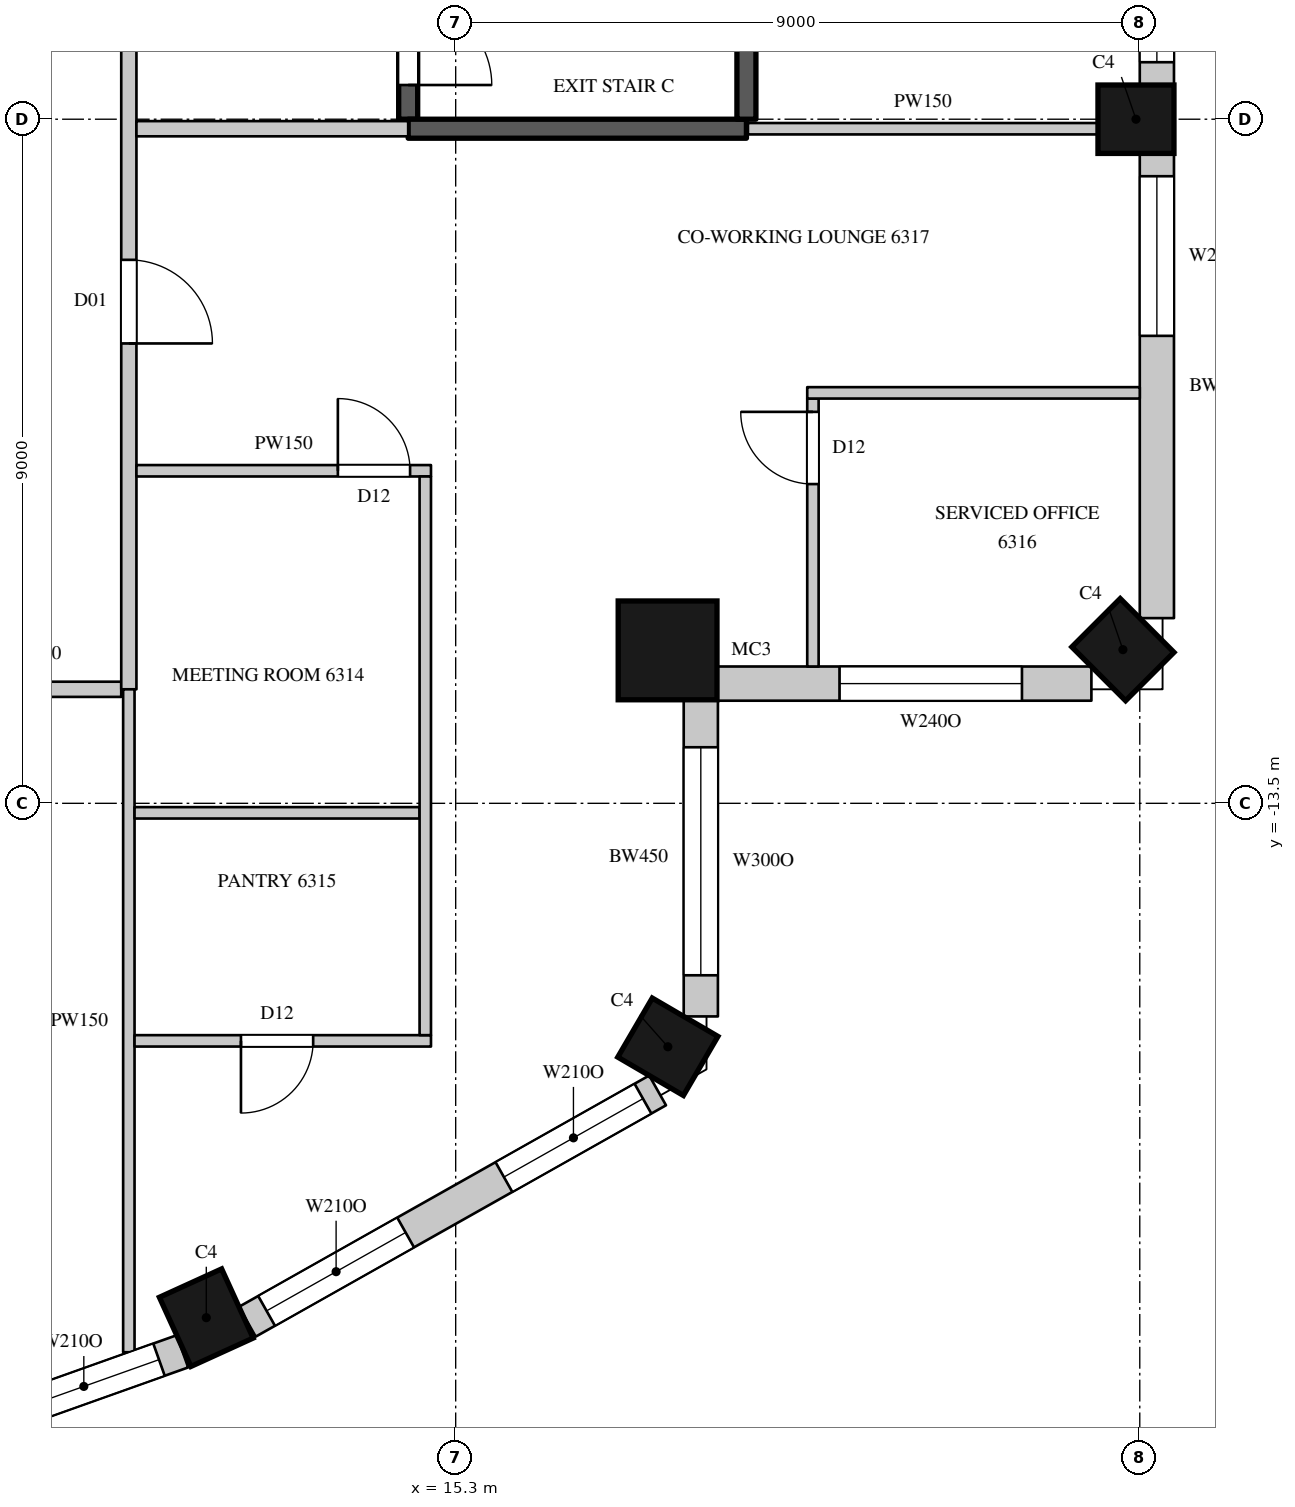
"""IFC4 building model, lengths in metres.
Left out: names, types, materials, properties, quantities, classifications, styles, units other than length and angle.
Written with IfcOpenShell. Run it as: python <this file> out.ifc"""

import sys

from ifc_helpers import new_model, si_unit, direction, frame, frame_2d, origin, origin_2d, place, context, subcontext, project, spatial, rectangle, circle, extrude, element, fill, save


model = new_model("IFC4")
c1 = context("Model", 3, precision=1e-05, world=origin(), true_north=direction((0.0, 1.0)))
c2 = subcontext(c1, "Body", "Model", "MODEL_VIEW")
j1 = project(units=[si_unit("LENGTHUNIT", "METRE"), si_unit("PLANEANGLEUNIT", "RADIAN")], contexts=[c1])
p1 = place(None, origin())
s1 = spatial("IfcSite", under=j1, at=p1, CompositionType="ELEMENT")
p2 = place(p1, origin())
s2 = spatial("IfcBuilding", under=s1, at=p2, CompositionType="ELEMENT")
p3 = place(p2, frame((0.0, 0.0, 280.3)))
s3 = spatial("IfcBuildingStorey", under=s2, at=p3, CompositionType="ELEMENT", Elevation=280.3)
for number, where, z_axis, x_axis in (
    (1, (12.019, -20.267, 0.0), (0.0, 0.0, 1.0), (0.91, 0.415, 0.0)),
    (2, (18.091, -16.703, 0.0), (0.0, 0.0, 1.0), (0.504, 0.863, 0.0)),
):
    element("IfcColumn", number, at=place(p3, frame(where, z_axis=z_axis, x_axis=x_axis)), inside=s3, PredefinedType="COLUMN", context=c2, shape_type="SweptSolid", body=[
        extrude(rectangle(XDim=0.9, YDim=1.0, at=origin_2d()), origin(), (0.0, 0.0, 1.0), 4.1),
    ])
p4 = place(p3, frame((18.088, -11.488, 0.0), z_axis=(0.0, 0.0, 1.0), x_axis=(1.0, 0.0, 0.0)))
e3 = element("IfcColumn", 3, at=p4, inside=s3, PredefinedType="COLUMN", context=c2, shape_type="SweptSolid", body=[
    extrude(circle(Radius=0.65, at=origin_2d()), origin(), (0.0, 0.0, 1.0), 4.1),
])
for number, where, z_axis, x_axis in (
    (4, (24.078, -11.478, 0.0), (0.0, 0.0, 1.0), (0.707, 0.707, 0.0)),
    (5, (24.25, -4.5, 0.0), (0.0, 0.0, 1.0), (0.0, 1.0, 0.0)),
):
    element("IfcColumn", number, at=place(p3, frame(where, z_axis=z_axis, x_axis=x_axis)), inside=s3, PredefinedType="COLUMN", context=c2, shape_type="SweptSolid", body=[
        extrude(rectangle(XDim=0.9, YDim=1.0, at=origin_2d()), origin(), (0.0, 0.0, 1.0), 4.1),
    ])
p5 = place(p3, frame((5.665, -22.859, 0.0), z_axis=(0.0, 0.0, 1.0), x_axis=(0.942108340262, 0.335308626803, 0.0)))
e6 = element("IfcWall", 6, at=p5, inside=s3, PredefinedType="SOLIDWALL", context=c2, shape_type="SweptSolid", body=[
    extrude(rectangle(XDim=6.412, YDim=0.45, at=frame_2d((3.206, 0.0))), origin(), (0.0, 0.0, 1.0), 3.8),
])
p6 = place(p5, frame((0.327, 0.0, 1.05)))
e7 = element("IfcOpeningElement", 7, at=p6, cuts=e6, PredefinedType="OPENING", context=c2, shape_type="SweptSolid", body=[
    extrude(rectangle(XDim=2.1, YDim=2.4, at=frame_2d((1.05, 1.2))), frame((0.0, 0.235, 0.0), z_axis=(0.0, -1.0, 0.0), x_axis=(1.0, 0.0, 0.0)), (0.0, 0.0, 1.0), 0.47),
])
p7 = place(p5, frame((3.985, 0.0, 1.05)))
e8 = element("IfcOpeningElement", 8, at=p7, cuts=e6, PredefinedType="OPENING", context=c2, shape_type="SweptSolid", body=[
    extrude(rectangle(XDim=2.1, YDim=2.4, at=frame_2d((1.05, 1.2))), frame((0.0, 0.235, 0.0), z_axis=(0.0, -1.0, 0.0), x_axis=(1.0, 0.0, 0.0)), (0.0, 0.0, 1.0), 0.47),
])
p8 = place(p3, frame((12.559, -20.32, 0.0), z_axis=(0.0, 0.0, 1.0), x_axis=(0.871065783524, 0.491166367714, 0.0)))
e9 = element("IfcWall", 9, at=p8, inside=s3, PredefinedType="SOLIDWALL", context=c2, shape_type="SweptSolid", body=[
    extrude(rectangle(XDim=6.196, YDim=0.45, at=frame_2d((3.098, 0.0))), origin(), (0.0, 0.0, 1.0), 3.8),
])
p9 = place(p8, frame((0.291, 0.0, 1.05)))
e10 = element("IfcOpeningElement", 10, at=p9, cuts=e9, PredefinedType="OPENING", context=c2, shape_type="SweptSolid", body=[
    extrude(rectangle(XDim=2.1, YDim=2.4, at=frame_2d((1.05, 1.2))), frame((0.0, 0.235, 0.0), z_axis=(0.0, -1.0, 0.0), x_axis=(1.0, 0.0, 0.0)), (0.0, 0.0, 1.0), 0.47),
])
p10 = place(p8, frame((3.875, 0.0, 1.05)))
e11 = element("IfcOpeningElement", 11, at=p10, cuts=e9, PredefinedType="OPENING", context=c2, shape_type="SweptSolid", body=[
    extrude(rectangle(XDim=2.1, YDim=2.4, at=frame_2d((1.05, 1.2))), frame((0.0, 0.235, 0.0), z_axis=(0.0, -1.0, 0.0), x_axis=(1.0, 0.0, 0.0)), (0.0, 0.0, 1.0), 0.47),
])
p11 = place(p3, frame((18.525, -16.304, 0.0), z_axis=(0.0, 0.0, 1.0), x_axis=(0.0, 1.0, 0.0)))
e12 = element("IfcWall", 12, at=p11, inside=s3, PredefinedType="SOLIDWALL", context=c2, shape_type="SweptSolid", body=[
    extrude(rectangle(XDim=4.202, YDim=0.45, at=frame_2d((2.101, 0.0))), origin(), (0.0, 0.0, 1.0), 3.8),
])
p12 = place(p11, frame((0.541, 0.0, 1.05)))
e13 = element("IfcOpeningElement", 13, at=p12, cuts=e12, PredefinedType="OPENING", context=c2, shape_type="SweptSolid", body=[
    extrude(rectangle(XDim=3.0, YDim=2.4, at=frame_2d((1.5, 1.2))), frame((0.0, 0.235, 0.0), z_axis=(0.0, -1.0, 0.0), x_axis=(1.0, 0.0, 0.0)), (0.0, 0.0, 1.0), 0.47),
])
p13 = place(p3, frame((18.701, -11.925, 0.0), z_axis=(0.0, 0.0, 1.0), x_axis=(1.0, 0.0, 0.0)))
e14 = element("IfcWall", 14, at=p13, inside=s3, PredefinedType="SOLIDWALL", context=c2, shape_type="SweptSolid", body=[
    extrude(rectangle(XDim=4.962, YDim=0.45, at=frame_2d((2.481, 0.0))), origin(), (0.0, 0.0, 1.0), 3.8),
])
p14 = place(p13, frame((1.648, 0.0, 1.05)))
e15 = element("IfcOpeningElement", 15, at=p14, cuts=e14, PredefinedType="OPENING", context=c2, shape_type="SweptSolid", body=[
    extrude(rectangle(XDim=2.4, YDim=2.4, at=frame_2d((1.2, 1.2))), frame((0.0, 0.235, 0.0), z_axis=(0.0, -1.0, 0.0), x_axis=(1.0, 0.0, 0.0)), (0.0, 0.0, 1.0), 0.47),
])
p15 = place(p3, frame((24.525, -11.064, 0.0), z_axis=(0.0, 0.0, 1.0), x_axis=(0.0, 1.0, 0.0)))
e16 = element("IfcWall", 16, at=p15, inside=s3, PredefinedType="SOLIDWALL", context=c2, shape_type="SweptSolid", body=[
    extrude(rectangle(XDim=6.114, YDim=0.45, at=frame_2d((3.057, 0.0))), origin(), (0.0, 0.0, 1.0), 3.8),
])
p16 = place(p15, frame((3.714, 0.0, 1.05)))
e17 = element("IfcOpeningElement", 17, at=p16, cuts=e16, PredefinedType="OPENING", context=c2, shape_type="SweptSolid", body=[
    extrude(rectangle(XDim=2.1, YDim=2.4, at=frame_2d((1.05, 1.2))), frame((0.0, 0.235, 0.0), z_axis=(0.0, -1.0, 0.0), x_axis=(1.0, 0.0, 0.0)), (0.0, 0.0, 1.0), 0.47),
])
p17 = place(p3, frame((24.525, -4.05, 0.0), z_axis=(0.0, 0.0, 1.0), x_axis=(0.0, 1.0, 0.0)))
e18 = element("IfcWall", 18, at=p17, inside=s3, PredefinedType="SOLIDWALL", context=c2, shape_type="SweptSolid", body=[
    extrude(rectangle(XDim=8.1, YDim=0.45, at=frame_2d((4.05, 0.0))), origin(), (0.0, 0.0, 1.0), 3.8),
])
p18 = place(p17, frame((0.3, 0.0, 1.05)))
e19 = element("IfcOpeningElement", 19, at=p18, cuts=e18, PredefinedType="OPENING", context=c2, shape_type="SweptSolid", body=[
    extrude(rectangle(XDim=3.0, YDim=2.4, at=frame_2d((1.5, 1.2))), frame((0.0, 0.235, 0.0), z_axis=(0.0, -1.0, 0.0), x_axis=(1.0, 0.0, 0.0)), (0.0, 0.0, 1.0), 0.47),
])
p19 = place(p17, frame((4.8, 0.0, 1.05)))
e20 = element("IfcOpeningElement", 20, at=p19, cuts=e18, PredefinedType="OPENING", context=c2, shape_type="SweptSolid", body=[
    extrude(rectangle(XDim=3.0, YDim=2.4, at=frame_2d((1.5, 1.2))), frame((0.0, 0.235, 0.0), z_axis=(0.0, -1.0, 0.0), x_axis=(1.0, 0.0, 0.0)), (0.0, 0.0, 1.0), 0.47),
])
p20 = place(p3, frame((-10.9, -12.0, 0.0), z_axis=(0.0, 0.0, 1.0), x_axis=(1.0, 0.0, 0.0)))
e21 = element("IfcWall", 21, at=p20, inside=s3, PredefinedType="PARTITIONING", context=c2, shape_type="SweptSolid", body=[
    extrude(rectangle(XDim=21.8, YDim=0.2, at=frame_2d((10.9, 0.0))), origin(), (0.0, 0.0, 1.0), 3.8),
])
p21 = place(p20, frame((1.1, 0.0, 0.0)))
e22 = element("IfcOpeningElement", 22, at=p21, cuts=e21, PredefinedType="OPENING", context=c2, shape_type="SweptSolid", body=[
    extrude(rectangle(XDim=0.9, YDim=2.2, at=frame_2d((0.45, 1.1))), frame((0.0, 0.11, 0.0), z_axis=(0.0, -1.0, 0.0), x_axis=(1.0, 0.0, 0.0)), (0.0, 0.0, 1.0), 0.22),
])
p22 = place(p20, frame((4.9, 0.0, 0.0)))
e23 = element("IfcOpeningElement", 23, at=p22, cuts=e21, PredefinedType="OPENING", context=c2, shape_type="SweptSolid", body=[
    extrude(rectangle(XDim=0.9, YDim=2.2, at=frame_2d((0.45, 1.1))), frame((0.0, 0.11, 0.0), z_axis=(0.0, -1.0, 0.0), x_axis=(1.0, 0.0, 0.0)), (0.0, 0.0, 1.0), 0.22),
])
p23 = place(p20, frame((7.0, 0.0, 0.0)))
e24 = element("IfcOpeningElement", 24, at=p23, cuts=e21, PredefinedType="OPENING", context=c2, shape_type="SweptSolid", body=[
    extrude(rectangle(XDim=0.9, YDim=2.2, at=frame_2d((0.45, 1.1))), frame((0.0, 0.11, 0.0), z_axis=(0.0, -1.0, 0.0), x_axis=(1.0, 0.0, 0.0)), (0.0, 0.0, 1.0), 0.22),
])
p24 = place(p20, frame((9.95, 0.0, 0.0)))
e25 = element("IfcOpeningElement", 25, at=p24, cuts=e21, PredefinedType="OPENING", context=c2, shape_type="SweptSolid", body=[
    extrude(rectangle(XDim=1.1, YDim=2.4, at=frame_2d((0.55, 1.2))), frame((0.0, 0.11, 0.0), z_axis=(0.0, -1.0, 0.0), x_axis=(1.0, 0.0, 0.0)), (0.0, 0.0, 1.0), 0.22),
])
p25 = place(p3, frame((11.0, -12.0, 0.0), z_axis=(0.0, 0.0, 1.0), x_axis=(0.0, 1.0, 0.0)))
e26 = element("IfcWall", 26, at=p25, inside=s3, PredefinedType="PARTITIONING", context=c2, shape_type="SweptSolid", body=[
    extrude(rectangle(XDim=24.1, YDim=0.2, at=frame_2d((12.05, 0.0))), origin(), (0.0, 0.0, 1.0), 3.8),
])
p26 = place(p25, frame((9.85, 0.0, 0.0)))
e27 = element("IfcOpeningElement", 27, at=p26, cuts=e26, PredefinedType="OPENING", context=c2, shape_type="SweptSolid", body=[
    extrude(rectangle(XDim=1.5, YDim=2.4, at=frame_2d((0.75, 1.2))), frame((0.0, 0.11, 0.0), z_axis=(0.0, -1.0, 0.0), x_axis=(1.0, 0.0, 0.0)), (0.0, 0.0, 1.0), 0.22),
])
p27 = place(p25, frame((4.55, 0.0, 0.0)))
e28 = element("IfcOpeningElement", 28, at=p27, cuts=e26, PredefinedType="OPENING", context=c2, shape_type="SweptSolid", body=[
    extrude(rectangle(XDim=1.1, YDim=2.4, at=frame_2d((0.55, 1.2))), frame((0.0, 0.11, 0.0), z_axis=(0.0, -1.0, 0.0), x_axis=(1.0, 0.0, 0.0)), (0.0, 0.0, 1.0), 0.22),
])
p28 = place(p3, frame((11.1, -4.625, 0.0), z_axis=(0.0, 0.0, 1.0), x_axis=(1.0, 0.0, 0.0)))
e29 = element("IfcWall", 29, at=p28, inside=s3, PredefinedType="PARTITIONING", context=c2, shape_type="SweptSolid", body=[
    extrude(rectangle(XDim=3.575, YDim=0.2, at=frame_2d((1.788, 0.0))), origin(), (0.0, 0.0, 1.0), 3.8),
])
p29 = place(p3, frame((11.0, -20.721, 0.0), z_axis=(0.0, 0.0, 1.0), x_axis=(0.0, 1.0, 0.0)))
e30 = element("IfcWall", 30, at=p29, inside=s3, PredefinedType="PARTITIONING", context=c2, shape_type="SweptSolid", body=[
    extrude(rectangle(XDim=8.721, YDim=0.15, at=frame_2d((4.361, 0.0))), origin(), (0.0, 0.0, 1.0), 3.8),
])
p30 = place(p3, frame((11.075, -16.625, 0.0), z_axis=(0.0, 0.0, 1.0), x_axis=(1.0, 0.0, 0.0)))
e31 = element("IfcWall", 31, at=p30, inside=s3, PredefinedType="PARTITIONING", context=c2, shape_type="SweptSolid", body=[
    extrude(rectangle(XDim=3.9, YDim=0.15, at=frame_2d((1.95, 0.0))), origin(), (0.0, 0.0, 1.0), 3.8),
])
p31 = place(p30, frame((1.4, 0.0, 0.0)))
e32 = element("IfcOpeningElement", 32, at=p31, cuts=e31, PredefinedType="OPENING", context=c2, shape_type="SweptSolid", body=[
    extrude(rectangle(XDim=0.95, YDim=2.2, at=frame_2d((0.475, 1.1))), frame((0.0, 0.085, 0.0), z_axis=(0.0, -1.0, 0.0), x_axis=(1.0, 0.0, 0.0)), (0.0, 0.0, 1.0), 0.17),
])
p32 = place(p3, frame((11.075, -13.625, 0.0), z_axis=(0.0, 0.0, 1.0), x_axis=(1.0, 0.0, 0.0)))
e33 = element("IfcWall", 33, at=p32, inside=s3, PredefinedType="PARTITIONING", context=c2, shape_type="SweptSolid", body=[
    extrude(rectangle(XDim=3.75, YDim=0.15, at=frame_2d((1.875, 0.0))), origin(), (0.0, 0.0, 1.0), 3.8),
])
p33 = place(p3, frame((11.1, -9.125, 0.0), z_axis=(0.0, 0.0, 1.0), x_axis=(1.0, 0.0, 0.0)))
e34 = element("IfcWall", 34, at=p33, inside=s3, PredefinedType="PARTITIONING", context=c2, shape_type="SweptSolid", body=[
    extrude(rectangle(XDim=3.875, YDim=0.15, at=frame_2d((1.938, 0.0))), origin(), (0.0, 0.0, 1.0), 3.8),
])
p34 = place(p33, frame((2.65, 0.0, 0.0)))
e35 = element("IfcOpeningElement", 35, at=p34, cuts=e34, PredefinedType="OPENING", context=c2, shape_type="SweptSolid", body=[
    extrude(rectangle(XDim=0.95, YDim=2.2, at=frame_2d((0.475, 1.1))), frame((0.0, 0.085, 0.0), z_axis=(0.0, -1.0, 0.0), x_axis=(1.0, 0.0, 0.0)), (0.0, 0.0, 1.0), 0.17),
])
p35 = place(p3, frame((14.9, -16.55, 0.0), z_axis=(0.0, 0.0, 1.0), x_axis=(0.0, 1.0, 0.0)))
e36 = element("IfcWall", 36, at=p35, inside=s3, PredefinedType="PARTITIONING", context=c2, shape_type="SweptSolid", body=[
    extrude(rectangle(XDim=7.35, YDim=0.15, at=frame_2d((3.675, 0.0))), origin(), (0.0, 0.0, 1.0), 3.8),
])
p36 = place(p3, frame((19.145, -4.625, 0.0), z_axis=(0.0, 0.0, 1.0), x_axis=(1.0, 0.0, 0.0)))
e37 = element("IfcWall", 37, at=p36, inside=s3, PredefinedType="PARTITIONING", context=c2, shape_type="SweptSolid", body=[
    extrude(rectangle(XDim=4.605, YDim=0.15, at=frame_2d((2.302, 0.0))), origin(), (0.0, 0.0, 1.0), 3.8),
])
p37 = place(p3, frame((20.0, -11.7, 0.0), z_axis=(0.0, 0.0, 1.0), x_axis=(0.0, 1.0, 0.0)))
e38 = element("IfcWall", 38, at=p37, inside=s3, PredefinedType="PARTITIONING", context=c2, shape_type="SweptSolid", body=[
    extrude(rectangle(XDim=3.525, YDim=0.15, at=frame_2d((1.762, 0.0))), origin(), (0.0, 0.0, 1.0), 3.8),
])
p38 = place(p37, frame((2.4, 0.0, 0.0)))
e39 = element("IfcOpeningElement", 39, at=p38, cuts=e38, PredefinedType="OPENING", context=c2, shape_type="SweptSolid", body=[
    extrude(rectangle(XDim=0.95, YDim=2.2, at=frame_2d((0.475, 1.1))), frame((0.0, 0.085, 0.0), z_axis=(0.0, -1.0, 0.0), x_axis=(1.0, 0.0, 0.0)), (0.0, 0.0, 1.0), 0.17),
])
p39 = place(p3, frame((19.925, -8.1, 0.0), z_axis=(0.0, 0.0, 1.0), x_axis=(1.0, 0.0, 0.0)))
e40 = element("IfcWall", 40, at=p39, inside=s3, PredefinedType="PARTITIONING", context=c2, shape_type="SweptSolid", body=[
    extrude(rectangle(XDim=4.375, YDim=0.15, at=frame_2d((2.188, 0.0))), origin(), (0.0, 0.0, 1.0), 3.15),
])
p40 = place(p3, frame((14.675, -4.5, 0.0), z_axis=(0.0, 0.0, 1.0), x_axis=(0.0, 1.0, 0.0)))
e41 = element("IfcWall", 41, at=p40, inside=s3, PredefinedType="SHEAR", context=c2, shape_type="SweptSolid", body=[
    extrude(rectangle(XDim=9.0, YDim=0.25, at=frame_2d((4.5, 0.0))), origin(), (0.0, 0.0, 1.0), 3.8),
])
p41 = place(p40, frame((0.45, 0.0, 0.0)))
e42 = element("IfcOpeningElement", 42, at=p41, cuts=e41, PredefinedType="OPENING", context=c2, shape_type="SweptSolid", body=[
    extrude(rectangle(XDim=1.1, YDim=2.2, at=frame_2d((0.55, 1.1))), frame((0.0, 0.135, 0.0), z_axis=(0.0, -1.0, 0.0), x_axis=(1.0, 0.0, 0.0)), (0.0, 0.0, 1.0), 0.27),
])
p42 = place(p3, frame((14.675, -4.625, 0.0), z_axis=(0.0, 0.0, 1.0), x_axis=(1.0, 0.0, 0.0)))
e43 = element("IfcWall", 43, at=p42, inside=s3, PredefinedType="SHEAR", context=c2, shape_type="SweptSolid", body=[
    extrude(rectangle(XDim=4.45, YDim=0.25, at=frame_2d((2.225, 0.0))), origin(), (0.0, 0.0, 1.0), 3.8),
])
p43 = place(p3, frame((19.125, -4.5, 0.0), z_axis=(0.0, 0.0, 1.0), x_axis=(0.0, 1.0, 0.0)))
e44 = element("IfcWall", 44, at=p43, inside=s3, PredefinedType="SHEAR", context=c2, shape_type="SweptSolid", body=[
    extrude(rectangle(XDim=9.0, YDim=0.25, at=frame_2d((4.5, 0.0))), origin(), (0.0, 0.0, 1.0), 3.8),
])
p44 = place(p7, origin())
e45 = element("IfcWindow", 45, at=p44, inside=s3, PartitioningType="SINGLE_PANEL", PredefinedType="WINDOW", context=c2, shape_type="SweptSolid", body=[
    extrude(rectangle(XDim=2.1, YDim=2.4, at=frame_2d((1.05, 1.2))), frame((0.0, 0.135, 0.0), z_axis=(0.0, -1.0, 0.0), x_axis=(1.0, 0.0, 0.0)), (0.0, 0.0, 1.0), 0.06),
])
fill(e8, e45)
p45 = place(p9, origin())
e46 = element("IfcWindow", 46, at=p45, inside=s3, PartitioningType="SINGLE_PANEL", PredefinedType="WINDOW", context=c2, shape_type="SweptSolid", body=[
    extrude(rectangle(XDim=2.1, YDim=2.4, at=frame_2d((1.05, 1.2))), frame((0.0, 0.135, 0.0), z_axis=(0.0, -1.0, 0.0), x_axis=(1.0, 0.0, 0.0)), (0.0, 0.0, 1.0), 0.06),
])
fill(e10, e46)
p46 = place(p10, origin())
e47 = element("IfcWindow", 47, at=p46, inside=s3, PartitioningType="SINGLE_PANEL", PredefinedType="WINDOW", context=c2, shape_type="SweptSolid", body=[
    extrude(rectangle(XDim=2.1, YDim=2.4, at=frame_2d((1.05, 1.2))), frame((0.0, 0.135, 0.0), z_axis=(0.0, -1.0, 0.0), x_axis=(1.0, 0.0, 0.0)), (0.0, 0.0, 1.0), 0.06),
])
fill(e11, e47)
p47 = place(p12, origin())
e48 = element("IfcWindow", 48, at=p47, inside=s3, PartitioningType="SINGLE_PANEL", PredefinedType="WINDOW", context=c2, shape_type="SweptSolid", body=[
    extrude(rectangle(XDim=3.0, YDim=2.4, at=frame_2d((1.5, 1.2))), frame((0.0, 0.135, 0.0), z_axis=(0.0, -1.0, 0.0), x_axis=(1.0, 0.0, 0.0)), (0.0, 0.0, 1.0), 0.06),
])
fill(e13, e48)
p48 = place(p16, origin())
e49 = element("IfcWindow", 49, at=p48, inside=s3, PartitioningType="SINGLE_PANEL", PredefinedType="WINDOW", context=c2, shape_type="SweptSolid", body=[
    extrude(rectangle(XDim=2.1, YDim=2.4, at=frame_2d((1.05, 1.2))), frame((0.0, 0.135, 0.0), z_axis=(0.0, -1.0, 0.0), x_axis=(1.0, 0.0, 0.0)), (0.0, 0.0, 1.0), 0.06),
])
fill(e17, e49)
p49 = place(p18, origin())
e50 = element("IfcWindow", 50, at=p49, inside=s3, PartitioningType="SINGLE_PANEL", PredefinedType="WINDOW", context=c2, shape_type="SweptSolid", body=[
    extrude(rectangle(XDim=3.0, YDim=2.4, at=frame_2d((1.5, 1.2))), frame((0.0, 0.135, 0.0), z_axis=(0.0, -1.0, 0.0), x_axis=(1.0, 0.0, 0.0)), (0.0, 0.0, 1.0), 0.06),
])
fill(e19, e50)
p50 = place(p27, origin())
e51 = element("IfcDoor", 51, at=p50, inside=s3, OperationType="SINGLE_SWING_RIGHT", PredefinedType="DOOR", context=c2, shape_type="SweptSolid", body=[
    extrude(rectangle(XDim=1.1, YDim=2.4, at=frame_2d((0.55, 1.2))), frame((0.0, 0.025, 0.0), z_axis=(0.0, -1.0, 0.0), x_axis=(1.0, 0.0, 0.0)), (0.0, 0.0, 1.0), 0.05),
])
fill(e28, e51)
p51 = place(p34, origin())
e52 = element("IfcDoor", 52, at=p51, inside=s3, OperationType="SINGLE_SWING_LEFT", PredefinedType="DOOR", context=c2, shape_type="SweptSolid", body=[
    extrude(rectangle(XDim=0.95, YDim=2.2, at=frame_2d((0.475, 1.1))), frame((0.0, 0.025, 0.0), z_axis=(0.0, -1.0, 0.0), x_axis=(1.0, 0.0, 0.0)), (0.0, 0.0, 1.0), 0.05),
])
fill(e35, e52)
p52 = place(p31, origin())
e53 = element("IfcDoor", 53, at=p52, inside=s3, OperationType="SINGLE_SWING_RIGHT", PredefinedType="DOOR", context=c2, shape_type="SweptSolid", body=[
    extrude(rectangle(XDim=0.95, YDim=2.2, at=frame_2d((0.475, 1.1))), frame((0.0, 0.025, 0.0), z_axis=(0.0, -1.0, 0.0), x_axis=(1.0, 0.0, 0.0)), (0.0, 0.0, 1.0), 0.05),
])
fill(e32, e53)
p53 = place(p38, origin())
e54 = element("IfcDoor", 54, at=p53, inside=s3, OperationType="SINGLE_SWING_RIGHT", PredefinedType="DOOR", context=c2, shape_type="SweptSolid", body=[
    extrude(rectangle(XDim=0.95, YDim=2.2, at=frame_2d((0.475, 1.1))), frame((0.0, 0.025, 0.0), z_axis=(0.0, -1.0, 0.0), x_axis=(1.0, 0.0, 0.0)), (0.0, 0.0, 1.0), 0.05),
])
fill(e39, e54)
p54 = place(p41, origin())
e55 = element("IfcDoor", 55, at=p54, inside=s3, OperationType="SINGLE_SWING_RIGHT", PredefinedType="DOOR", context=c2, shape_type="SweptSolid", body=[
    extrude(rectangle(XDim=1.1, YDim=2.2, at=frame_2d((0.55, 1.1))), frame((0.0, 0.025, 0.0), z_axis=(0.0, -1.0, 0.0), x_axis=(1.0, 0.0, 0.0)), (0.0, 0.0, 1.0), 0.05),
])
fill(e42, e55)
p55 = place(p14, origin())
e56 = element("IfcWindow", 56, at=p55, inside=s3, PartitioningType="SINGLE_PANEL", PredefinedType="WINDOW", context=c2, shape_type="SweptSolid", body=[
    extrude(rectangle(XDim=2.4, YDim=2.4, at=frame_2d((1.2, 1.2))), frame((0.0, 0.135, 0.0), z_axis=(0.0, -1.0, 0.0), x_axis=(1.0, 0.0, 0.0)), (0.0, 0.0, 1.0), 0.06),
])
fill(e15, e56)
save(model, sys.argv[1])
